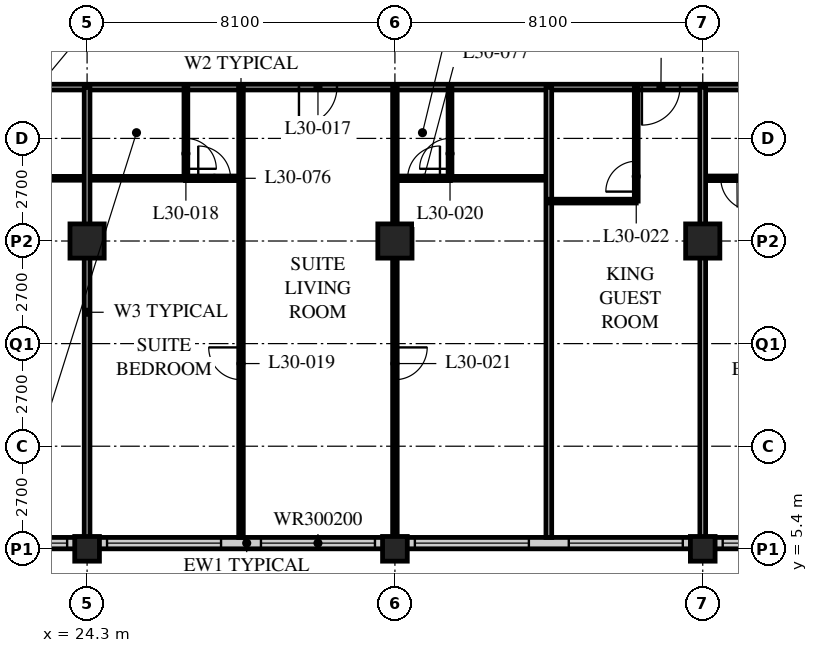
"""IFC4 building model, lengths in metres.
Left out: names, types, materials, properties, quantities, classifications, styles, units other than length and angle.
Written with IfcOpenShell. Run it as: python <this file> out.ifc"""

import sys

from ifc_helpers import new_model, si_unit, direction, frame, frame_2d, origin, origin_2d, place, context, subcontext, project, spatial, rectangle, hollow_rectangle, extrude, element, fill, save


model = new_model("IFC4")
c1 = context("Model", 3, precision=1e-05, world=origin(), true_north=direction((0.0, 1.0)))
c2 = subcontext(c1, "Body", "Model", "MODEL_VIEW")
j1 = project(units=[si_unit("LENGTHUNIT", "METRE"), si_unit("PLANEANGLEUNIT", "RADIAN")], contexts=[c1])
p1 = place(None, origin())
s1 = spatial("IfcSite", under=j1, at=p1, CompositionType="ELEMENT")
p2 = place(p1, origin())
s2 = spatial("IfcBuilding", under=s1, at=p2, CompositionType="ELEMENT")
p3 = place(p2, frame((0.0, 0.0, 120.4)))
s3 = spatial("IfcBuildingStorey", under=s2, at=p3, CompositionType="ELEMENT", Elevation=120.4)
p4 = place(p3, frame((24.3, 5.4, 0.0), z_axis=(0.0, 0.0, 1.0), x_axis=(1.0, 0.0, 0.0)))
e1 = element("IfcColumn", 1, at=p4, inside=s3, PredefinedType="COLUMN", context=c2, shape_type="SweptSolid", body=[
    extrude(hollow_rectangle(XDim=0.65, YDim=0.65, WallThickness=0.055, at=origin_2d()), origin(), (0.0, 0.0, 1.0), 3.4),
])
p5 = place(p3, frame((24.3, 13.5, 0.0), z_axis=(0.0, 0.0, 1.0), x_axis=(1.0, 0.0, 0.0)))
e2 = element("IfcColumn", 2, at=p5, inside=s3, PredefinedType="COLUMN", context=c2, shape_type="SweptSolid", body=[
    extrude(hollow_rectangle(XDim=0.9, YDim=0.9, WallThickness=0.09, at=origin_2d()), origin(), (0.0, 0.0, 1.0), 3.4),
])
p6 = place(p3, frame((32.4, 5.4, 0.0), z_axis=(0.0, 0.0, 1.0), x_axis=(1.0, 0.0, 0.0)))
e3 = element("IfcColumn", 3, at=p6, inside=s3, PredefinedType="COLUMN", context=c2, shape_type="SweptSolid", body=[
    extrude(hollow_rectangle(XDim=0.65, YDim=0.65, WallThickness=0.055, at=origin_2d()), origin(), (0.0, 0.0, 1.0), 3.4),
])
p7 = place(p3, frame((32.4, 13.5, 0.0), z_axis=(0.0, 0.0, 1.0), x_axis=(1.0, 0.0, 0.0)))
e4 = element("IfcColumn", 4, at=p7, inside=s3, PredefinedType="COLUMN", context=c2, shape_type="SweptSolid", body=[
    extrude(hollow_rectangle(XDim=0.9, YDim=0.9, WallThickness=0.09, at=origin_2d()), origin(), (0.0, 0.0, 1.0), 3.4),
])
p8 = place(p3, frame((40.5, 5.4, 0.0), z_axis=(0.0, 0.0, 1.0), x_axis=(1.0, 0.0, 0.0)))
e5 = element("IfcColumn", 5, at=p8, inside=s3, PredefinedType="COLUMN", context=c2, shape_type="SweptSolid", body=[
    extrude(hollow_rectangle(XDim=0.65, YDim=0.65, WallThickness=0.055, at=origin_2d()), origin(), (0.0, 0.0, 1.0), 3.4),
])
p9 = place(p3, frame((40.5, 13.5, 0.0), z_axis=(0.0, 0.0, 1.0), x_axis=(1.0, 0.0, 0.0)))
e6 = element("IfcColumn", 6, at=p9, inside=s3, PredefinedType="COLUMN", context=c2, shape_type="SweptSolid", body=[
    extrude(hollow_rectangle(XDim=0.9, YDim=0.9, WallThickness=0.09, at=origin_2d()), origin(), (0.0, 0.0, 1.0), 3.4),
])
p10 = place(p3, frame((8.4, 5.55, 0.0), z_axis=(0.0, 0.0, 1.0), x_axis=(1.0, 0.0, 0.0)))
e7 = element("IfcWall", 7, at=p10, inside=s3, PredefinedType="SOLIDWALL", context=c2, shape_type="SweptSolid", body=[
    extrude(rectangle(XDim=40.2, YDim=0.3, at=frame_2d((20.1, 0.0))), origin(), (0.0, 0.0, 1.0), 3.19),
])
p11 = place(p10, frame((0.225, 0.0, 0.9)))
e8 = element("IfcOpeningElement", 8, at=p11, cuts=e7, PredefinedType="OPENING", context=c2, shape_type="SweptSolid", body=[
    extrude(rectangle(XDim=3.0, YDim=2.0, at=frame_2d((1.5, 1.0))), frame((0.0, 0.16, 0.0), z_axis=(0.0, -1.0, 0.0), x_axis=(1.0, 0.0, 0.0)), (0.0, 0.0, 1.0), 0.32),
])
p12 = place(p10, frame((4.275, 0.0, 0.9)))
e9 = element("IfcOpeningElement", 9, at=p12, cuts=e7, PredefinedType="OPENING", context=c2, shape_type="SweptSolid", body=[
    extrude(rectangle(XDim=3.0, YDim=2.0, at=frame_2d((1.5, 1.0))), frame((0.0, 0.16, 0.0), z_axis=(0.0, -1.0, 0.0), x_axis=(1.0, 0.0, 0.0)), (0.0, 0.0, 1.0), 0.32),
])
p13 = place(p10, frame((8.325, 0.0, 0.9)))
e10 = element("IfcOpeningElement", 10, at=p13, cuts=e7, PredefinedType="OPENING", context=c2, shape_type="SweptSolid", body=[
    extrude(rectangle(XDim=3.0, YDim=2.0, at=frame_2d((1.5, 1.0))), frame((0.0, 0.16, 0.0), z_axis=(0.0, -1.0, 0.0), x_axis=(1.0, 0.0, 0.0)), (0.0, 0.0, 1.0), 0.32),
])
p14 = place(p10, frame((12.375, 0.0, 0.9)))
e11 = element("IfcOpeningElement", 11, at=p14, cuts=e7, PredefinedType="OPENING", context=c2, shape_type="SweptSolid", body=[
    extrude(rectangle(XDim=3.0, YDim=2.0, at=frame_2d((1.5, 1.0))), frame((0.0, 0.16, 0.0), z_axis=(0.0, -1.0, 0.0), x_axis=(1.0, 0.0, 0.0)), (0.0, 0.0, 1.0), 0.32),
])
p15 = place(p10, frame((16.425, 0.0, 0.9)))
e12 = element("IfcOpeningElement", 12, at=p15, cuts=e7, PredefinedType="OPENING", context=c2, shape_type="SweptSolid", body=[
    extrude(rectangle(XDim=3.0, YDim=2.0, at=frame_2d((1.5, 1.0))), frame((0.0, 0.16, 0.0), z_axis=(0.0, -1.0, 0.0), x_axis=(1.0, 0.0, 0.0)), (0.0, 0.0, 1.0), 0.32),
])
p16 = place(p10, frame((20.475, 0.0, 0.9)))
e13 = element("IfcOpeningElement", 13, at=p16, cuts=e7, PredefinedType="OPENING", context=c2, shape_type="SweptSolid", body=[
    extrude(rectangle(XDim=3.0, YDim=2.0, at=frame_2d((1.5, 1.0))), frame((0.0, 0.16, 0.0), z_axis=(0.0, -1.0, 0.0), x_axis=(1.0, 0.0, 0.0)), (0.0, 0.0, 1.0), 0.32),
])
p17 = place(p10, frame((24.525, 0.0, 0.9)))
e14 = element("IfcOpeningElement", 14, at=p17, cuts=e7, PredefinedType="OPENING", context=c2, shape_type="SweptSolid", body=[
    extrude(rectangle(XDim=3.0, YDim=2.0, at=frame_2d((1.5, 1.0))), frame((0.0, 0.16, 0.0), z_axis=(0.0, -1.0, 0.0), x_axis=(1.0, 0.0, 0.0)), (0.0, 0.0, 1.0), 0.32),
])
p18 = place(p10, frame((28.575, 0.0, 0.9)))
e15 = element("IfcOpeningElement", 15, at=p18, cuts=e7, PredefinedType="OPENING", context=c2, shape_type="SweptSolid", body=[
    extrude(rectangle(XDim=3.0, YDim=2.0, at=frame_2d((1.5, 1.0))), frame((0.0, 0.16, 0.0), z_axis=(0.0, -1.0, 0.0), x_axis=(1.0, 0.0, 0.0)), (0.0, 0.0, 1.0), 0.32),
])
p19 = place(p10, frame((32.625, 0.0, 0.9)))
e16 = element("IfcOpeningElement", 16, at=p19, cuts=e7, PredefinedType="OPENING", context=c2, shape_type="SweptSolid", body=[
    extrude(rectangle(XDim=3.0, YDim=2.0, at=frame_2d((1.5, 1.0))), frame((0.0, 0.16, 0.0), z_axis=(0.0, -1.0, 0.0), x_axis=(1.0, 0.0, 0.0)), (0.0, 0.0, 1.0), 0.32),
])
p20 = place(p10, frame((36.675, 0.0, 0.9)))
e17 = element("IfcOpeningElement", 17, at=p20, cuts=e7, PredefinedType="OPENING", context=c2, shape_type="SweptSolid", body=[
    extrude(rectangle(XDim=3.0, YDim=2.0, at=frame_2d((1.5, 1.0))), frame((0.0, 0.16, 0.0), z_axis=(0.0, -1.0, 0.0), x_axis=(1.0, 0.0, 0.0)), (0.0, 0.0, 1.0), 0.32),
])
p21 = place(p3, frame((12.15, 17.55, 0.0), z_axis=(0.0, 0.0, 1.0), x_axis=(1.0, 0.0, 0.0)))
e18 = element("IfcWall", 18, at=p21, inside=s3, PredefinedType="PARTITIONING", context=c2, shape_type="SweptSolid", body=[
    extrude(rectangle(XDim=32.4, YDim=0.15, at=frame_2d((16.2, 0.0))), origin(), (0.0, 0.0, 1.0), 3.19),
])
p22 = place(p21, frame((5.95, 0.0, 0.0)))
e19 = element("IfcOpeningElement", 19, at=p22, cuts=e18, PredefinedType="OPENING", context=c2, shape_type="SweptSolid", body=[
    extrude(rectangle(XDim=1.0, YDim=2.1, at=frame_2d((0.5, 1.05))), frame((0.0, 0.085, 0.0), z_axis=(0.0, -1.0, 0.0), x_axis=(1.0, 0.0, 0.0)), (0.0, 0.0, 1.0), 0.17),
])
p23 = place(p21, frame((17.725, 0.0, 0.0)))
e20 = element("IfcOpeningElement", 20, at=p23, cuts=e18, PredefinedType="OPENING", context=c2, shape_type="SweptSolid", body=[
    extrude(rectangle(XDim=1.0, YDim=2.1, at=frame_2d((0.5, 1.05))), frame((0.0, 0.085, 0.0), z_axis=(0.0, -1.0, 0.0), x_axis=(1.0, 0.0, 0.0)), (0.0, 0.0, 1.0), 0.17),
])
p24 = place(p21, frame((26.75, 0.0, 0.0)))
e21 = element("IfcOpeningElement", 21, at=p24, cuts=e18, PredefinedType="OPENING", context=c2, shape_type="SweptSolid", body=[
    extrude(rectangle(XDim=1.0, YDim=2.1, at=frame_2d((0.5, 1.05))), frame((0.0, 0.085, 0.0), z_axis=(0.0, -1.0, 0.0), x_axis=(1.0, 0.0, 0.0)), (0.0, 0.0, 1.0), 0.17),
])
p25 = place(p21, frame((1.525, 0.0, 0.0)))
e22 = element("IfcOpeningElement", 22, at=p25, cuts=e18, PredefinedType="OPENING", context=c2, shape_type="SweptSolid", body=[
    extrude(rectangle(XDim=1.0, YDim=2.1, at=frame_2d((0.5, 1.05))), frame((0.0, 0.085, 0.0), z_axis=(0.0, -1.0, 0.0), x_axis=(1.0, 0.0, 0.0)), (0.0, 0.0, 1.0), 0.17),
])
p26 = place(p21, frame((29.875, 0.0, 0.0)))
e23 = element("IfcOpeningElement", 23, at=p26, cuts=e18, PredefinedType="OPENING", context=c2, shape_type="SweptSolid", body=[
    extrude(rectangle(XDim=1.0, YDim=2.1, at=frame_2d((0.5, 1.05))), frame((0.0, 0.085, 0.0), z_axis=(0.0, -1.0, 0.0), x_axis=(1.0, 0.0, 0.0)), (0.0, 0.0, 1.0), 0.17),
])
p27 = place(p3, frame((21.7, 15.15, 0.0), z_axis=(0.0, 0.0, 1.0), x_axis=(1.0, 0.0, 0.0)))
e24 = element("IfcWall", 24, at=p27, inside=s3, PredefinedType="PARTITIONING", context=c2, shape_type="SweptSolid", body=[
    extrude(rectangle(XDim=5.2, YDim=0.1, at=frame_2d((2.6, 0.0))), origin(), (0.0, 0.0, 1.0), 3.19),
])
p28 = place(p3, frame((24.3, 17.55, 0.0), z_axis=(0.0, 0.0, 1.0), x_axis=(0.0, -1.0, 0.0)))
e25 = element("IfcWall", 25, at=p28, inside=s3, PredefinedType="PARTITIONING", context=c2, shape_type="SweptSolid", body=[
    extrude(rectangle(XDim=11.85, YDim=0.15, at=frame_2d((5.925, 0.0))), origin(), (0.0, 0.0, 1.0), 2.578),
])
p29 = place(p3, frame((26.9, 17.55, 0.0), z_axis=(0.0, 0.0, 1.0), x_axis=(0.0, -1.0, 0.0)))
e26 = element("IfcWall", 26, at=p29, inside=s3, PredefinedType="PARTITIONING", context=c2, shape_type="SweptSolid", body=[
    extrude(rectangle(XDim=2.4, YDim=0.1, at=frame_2d((1.2, 0.0))), origin(), (0.0, 0.0, 1.0), 3.19),
])
p30 = place(p29, frame((1.35, 0.0, 0.0)))
e27 = element("IfcOpeningElement", 27, at=p30, cuts=e26, PredefinedType="OPENING", context=c2, shape_type="SweptSolid", body=[
    extrude(rectangle(XDim=0.8, YDim=2.1, at=frame_2d((0.4, 1.05))), frame((0.0, 0.06, 0.0), z_axis=(0.0, -1.0, 0.0), x_axis=(1.0, 0.0, 0.0)), (0.0, 0.0, 1.0), 0.12),
])
p31 = place(p3, frame((28.35, 17.55, 0.0), z_axis=(0.0, 0.0, 1.0), x_axis=(0.0, -1.0, 0.0)))
e28 = element("IfcWall", 28, at=p31, inside=s3, PredefinedType="PARTITIONING", context=c2, shape_type="SweptSolid", body=[
    extrude(rectangle(XDim=11.85, YDim=0.12, at=frame_2d((5.925, 0.0))), origin(), (0.0, 0.0, 1.0), 3.19),
])
p32 = place(p31, frame((6.85, 0.0, 0.0)))
e29 = element("IfcOpeningElement", 29, at=p32, cuts=e28, PredefinedType="OPENING", context=c2, shape_type="SweptSolid", body=[
    extrude(rectangle(XDim=0.85, YDim=2.1, at=frame_2d((0.425, 1.05))), frame((0.0, 0.07, 0.0), z_axis=(0.0, -1.0, 0.0), x_axis=(1.0, 0.0, 0.0)), (0.0, 0.0, 1.0), 0.14),
])
p33 = place(p3, frame((33.85, 15.15, 0.0), z_axis=(0.0, 0.0, 1.0), x_axis=(1.0, 0.0, 0.0)))
e30 = element("IfcWall", 30, at=p33, inside=s3, PredefinedType="PARTITIONING", context=c2, shape_type="SweptSolid", body=[
    extrude(rectangle(XDim=2.6, YDim=0.1, at=frame_2d((1.3, 0.0))), origin(), (0.0, 0.0, 1.0), 3.19),
])
p34 = place(p3, frame((33.85, 17.55, 0.0), z_axis=(0.0, 0.0, 1.0), x_axis=(0.0, -1.0, 0.0)))
e31 = element("IfcWall", 31, at=p34, inside=s3, PredefinedType="PARTITIONING", context=c2, shape_type="SweptSolid", body=[
    extrude(rectangle(XDim=2.4, YDim=0.1, at=frame_2d((1.2, 0.0))), origin(), (0.0, 0.0, 1.0), 3.19),
])
p35 = place(p34, frame((1.35, 0.0, 0.0)))
e32 = element("IfcOpeningElement", 32, at=p35, cuts=e31, PredefinedType="OPENING", context=c2, shape_type="SweptSolid", body=[
    extrude(rectangle(XDim=0.8, YDim=2.1, at=frame_2d((0.4, 1.05))), frame((0.0, 0.06, 0.0), z_axis=(0.0, -1.0, 0.0), x_axis=(1.0, 0.0, 0.0)), (0.0, 0.0, 1.0), 0.12),
])
p36 = place(p3, frame((32.4, 17.55, 0.0), z_axis=(0.0, 0.0, 1.0), x_axis=(0.0, -1.0, 0.0)))
e33 = element("IfcWall", 33, at=p36, inside=s3, PredefinedType="PARTITIONING", context=c2, shape_type="SweptSolid", body=[
    extrude(rectangle(XDim=11.85, YDim=0.12, at=frame_2d((5.925, 0.0))), origin(), (0.0, 0.0, 1.0), 2.578),
])
p37 = place(p36, frame((6.85, 0.0, 0.0)))
e34 = element("IfcOpeningElement", 34, at=p37, cuts=e33, PredefinedType="OPENING", context=c2, shape_type="SweptSolid", body=[
    extrude(rectangle(XDim=0.85, YDim=2.1, at=frame_2d((0.425, 1.05))), frame((0.0, 0.07, 0.0), z_axis=(0.0, -1.0, 0.0), x_axis=(1.0, 0.0, 0.0)), (0.0, 0.0, 1.0), 0.14),
])
p38 = place(p3, frame((36.45, 17.55, 0.0), z_axis=(0.0, 0.0, 1.0), x_axis=(0.0, -1.0, 0.0)))
e35 = element("IfcWall", 35, at=p38, inside=s3, PredefinedType="PARTITIONING", context=c2, shape_type="SweptSolid", body=[
    extrude(rectangle(XDim=11.85, YDim=0.15, at=frame_2d((5.925, 0.0))), origin(), (0.0, 0.0, 1.0), 3.19),
])
p39 = place(p3, frame((36.45, 14.55, 0.0), z_axis=(0.0, 0.0, 1.0), x_axis=(1.0, 0.0, 0.0)))
e36 = element("IfcWall", 36, at=p39, inside=s3, PredefinedType="PARTITIONING", context=c2, shape_type="SweptSolid", body=[
    extrude(rectangle(XDim=2.3, YDim=0.1, at=frame_2d((1.15, 0.0))), origin(), (0.0, 0.0, 1.0), 3.19),
])
p40 = place(p3, frame((38.75, 17.55, 0.0), z_axis=(0.0, 0.0, 1.0), x_axis=(0.0, -1.0, 0.0)))
e37 = element("IfcWall", 37, at=p40, inside=s3, PredefinedType="PARTITIONING", context=c2, shape_type="SweptSolid", body=[
    extrude(rectangle(XDim=3.0, YDim=0.1, at=frame_2d((1.5, 0.0))), origin(), (0.0, 0.0, 1.0), 3.19),
])
p41 = place(p40, frame((1.95, 0.0, 0.0)))
e38 = element("IfcOpeningElement", 38, at=p41, cuts=e37, PredefinedType="OPENING", context=c2, shape_type="SweptSolid", body=[
    extrude(rectangle(XDim=0.8, YDim=2.1, at=frame_2d((0.4, 1.05))), frame((0.0, 0.06, 0.0), z_axis=(0.0, -1.0, 0.0), x_axis=(1.0, 0.0, 0.0)), (0.0, 0.0, 1.0), 0.12),
])
p42 = place(p3, frame((40.5, 15.15, 0.0), z_axis=(0.0, 0.0, 1.0), x_axis=(1.0, 0.0, 0.0)))
e39 = element("IfcWall", 39, at=p42, inside=s3, PredefinedType="PARTITIONING", context=c2, shape_type="SweptSolid", body=[
    extrude(rectangle(XDim=8.05, YDim=0.12, at=frame_2d((4.025, 0.0))), origin(), (0.0, 0.0, 1.0), 3.19),
])
p43 = place(p42, frame((0.475, 0.0, 0.0)))
e40 = element("IfcOpeningElement", 40, at=p43, cuts=e39, PredefinedType="OPENING", context=c2, shape_type="SweptSolid", body=[
    extrude(rectangle(XDim=0.85, YDim=2.1, at=frame_2d((0.425, 1.05))), frame((0.0, 0.07, 0.0), z_axis=(0.0, -1.0, 0.0), x_axis=(1.0, 0.0, 0.0)), (0.0, 0.0, 1.0), 0.14),
])
p44 = place(p42, frame((4.325, 0.0, 0.0)))
e41 = element("IfcOpeningElement", 41, at=p44, cuts=e39, PredefinedType="OPENING", context=c2, shape_type="SweptSolid", body=[
    extrude(rectangle(XDim=0.85, YDim=2.1, at=frame_2d((0.425, 1.05))), frame((0.0, 0.07, 0.0), z_axis=(0.0, -1.0, 0.0), x_axis=(1.0, 0.0, 0.0)), (0.0, 0.0, 1.0), 0.14),
])
p45 = place(p3, frame((40.5, 17.55, 0.0), z_axis=(0.0, 0.0, 1.0), x_axis=(0.0, -1.0, 0.0)))
e42 = element("IfcWall", 42, at=p45, inside=s3, PredefinedType="PARTITIONING", context=c2, shape_type="SweptSolid", body=[
    extrude(rectangle(XDim=11.85, YDim=0.15, at=frame_2d((5.925, 0.0))), origin(), (0.0, 0.0, 1.0), 2.578),
])
p46 = place(p3, frame((28.35, 15.15, 0.0), z_axis=(0.0, 0.0, 1.0), x_axis=(-1.0, 0.0, 0.0)))
e43 = element("IfcWall", 43, at=p46, inside=s3, PredefinedType="PARTITIONING", context=c2, shape_type="SweptSolid", body=[
    extrude(rectangle(XDim=1.46, YDim=0.12, at=frame_2d((0.73, 0.0))), origin(), (0.0, 0.0, 1.0), 3.19),
])
p47 = place(p46, frame((0.275, 0.0, 0.0)))
e44 = element("IfcOpeningElement", 44, at=p47, cuts=e43, PredefinedType="OPENING", context=c2, shape_type="SweptSolid", body=[
    extrude(rectangle(XDim=0.85, YDim=2.1, at=frame_2d((0.425, 1.05))), frame((0.0, 0.07, 0.0), z_axis=(0.0, -1.0, 0.0), x_axis=(1.0, 0.0, 0.0)), (0.0, 0.0, 1.0), 0.14),
])
p48 = place(p3, frame((33.86, 15.15, 0.0), z_axis=(0.0, 0.0, 1.0), x_axis=(-1.0, 0.0, 0.0)))
e45 = element("IfcWall", 45, at=p48, inside=s3, PredefinedType="PARTITIONING", context=c2, shape_type="SweptSolid", body=[
    extrude(rectangle(XDim=1.46, YDim=0.12, at=frame_2d((0.73, 0.0))), origin(), (0.0, 0.0, 1.0), 3.19),
])
p49 = place(p48, frame((0.275, 0.0, 0.0)))
e46 = element("IfcOpeningElement", 46, at=p49, cuts=e45, PredefinedType="OPENING", context=c2, shape_type="SweptSolid", body=[
    extrude(rectangle(XDim=0.85, YDim=2.1, at=frame_2d((0.425, 1.05))), frame((0.0, 0.07, 0.0), z_axis=(0.0, -1.0, 0.0), x_axis=(1.0, 0.0, 0.0)), (0.0, 0.0, 1.0), 0.14),
])
p50 = place(p14, origin())
e47 = element("IfcWindow", 47, at=p50, inside=s3, PartitioningType="SINGLE_PANEL", PredefinedType="WINDOW", context=c2, shape_type="SweptSolid", body=[
    extrude(rectangle(XDim=3.0, YDim=2.0, at=frame_2d((1.5, 1.0))), frame((0.0, 0.03, 0.0), z_axis=(0.0, -1.0, 0.0), x_axis=(1.0, 0.0, 0.0)), (0.0, 0.0, 1.0), 0.06),
])
fill(e11, e47)
p51 = place(p15, origin())
e48 = element("IfcWindow", 48, at=p51, inside=s3, PartitioningType="SINGLE_PANEL", PredefinedType="WINDOW", context=c2, shape_type="SweptSolid", body=[
    extrude(rectangle(XDim=3.0, YDim=2.0, at=frame_2d((1.5, 1.0))), frame((0.0, 0.03, 0.0), z_axis=(0.0, -1.0, 0.0), x_axis=(1.0, 0.0, 0.0)), (0.0, 0.0, 1.0), 0.06),
])
fill(e12, e48)
p52 = place(p16, origin())
e49 = element("IfcWindow", 49, at=p52, inside=s3, PartitioningType="SINGLE_PANEL", PredefinedType="WINDOW", context=c2, shape_type="SweptSolid", body=[
    extrude(rectangle(XDim=3.0, YDim=2.0, at=frame_2d((1.5, 1.0))), frame((0.0, 0.03, 0.0), z_axis=(0.0, -1.0, 0.0), x_axis=(1.0, 0.0, 0.0)), (0.0, 0.0, 1.0), 0.06),
])
fill(e13, e49)
p53 = place(p17, origin())
e50 = element("IfcWindow", 50, at=p53, inside=s3, PartitioningType="SINGLE_PANEL", PredefinedType="WINDOW", context=c2, shape_type="SweptSolid", body=[
    extrude(rectangle(XDim=3.0, YDim=2.0, at=frame_2d((1.5, 1.0))), frame((0.0, 0.03, 0.0), z_axis=(0.0, -1.0, 0.0), x_axis=(1.0, 0.0, 0.0)), (0.0, 0.0, 1.0), 0.06),
])
fill(e14, e50)
p54 = place(p18, origin())
e51 = element("IfcWindow", 51, at=p54, inside=s3, PartitioningType="SINGLE_PANEL", PredefinedType="WINDOW", context=c2, shape_type="SweptSolid", body=[
    extrude(rectangle(XDim=3.0, YDim=2.0, at=frame_2d((1.5, 1.0))), frame((0.0, 0.03, 0.0), z_axis=(0.0, -1.0, 0.0), x_axis=(1.0, 0.0, 0.0)), (0.0, 0.0, 1.0), 0.06),
])
fill(e15, e51)
p55 = place(p19, origin())
e52 = element("IfcWindow", 52, at=p55, inside=s3, PartitioningType="SINGLE_PANEL", PredefinedType="WINDOW", context=c2, shape_type="SweptSolid", body=[
    extrude(rectangle(XDim=3.0, YDim=2.0, at=frame_2d((1.5, 1.0))), frame((0.0, 0.03, 0.0), z_axis=(0.0, -1.0, 0.0), x_axis=(1.0, 0.0, 0.0)), (0.0, 0.0, 1.0), 0.06),
])
fill(e16, e52)
p56 = place(p23, origin())
e53 = element("IfcDoor", 53, at=p56, inside=s3, OperationType="SINGLE_SWING_RIGHT", PredefinedType="DOOR", context=c2, shape_type="SweptSolid", body=[
    extrude(rectangle(XDim=1.0, YDim=2.1, at=frame_2d((0.5, 1.05))), frame((0.0, 0.025, 0.0), z_axis=(0.0, -1.0, 0.0), x_axis=(1.0, 0.0, 0.0)), (0.0, 0.0, 1.0), 0.05),
])
fill(e20, e53)
p57 = place(p30, origin())
e54 = element("IfcDoor", 54, at=p57, inside=s3, OperationType="SINGLE_SWING_RIGHT", PredefinedType="DOOR", context=c2, shape_type="SweptSolid", body=[
    extrude(rectangle(XDim=0.8, YDim=2.1, at=frame_2d((0.4, 1.05))), frame((0.0, 0.025, 0.0), z_axis=(0.0, -1.0, 0.0), x_axis=(1.0, 0.0, 0.0)), (0.0, 0.0, 1.0), 0.05),
])
fill(e27, e54)
p58 = place(p32, origin())
e55 = element("IfcDoor", 55, at=p58, inside=s3, OperationType="SINGLE_SWING_RIGHT", PredefinedType="DOOR", context=c2, shape_type="SweptSolid", body=[
    extrude(rectangle(XDim=0.85, YDim=2.1, at=frame_2d((0.425, 1.05))), frame((0.0, 0.025, 0.0), z_axis=(0.0, -1.0, 0.0), x_axis=(1.0, 0.0, 0.0)), (0.0, 0.0, 1.0), 0.05),
])
fill(e29, e55)
p59 = place(p35, origin())
e56 = element("IfcDoor", 56, at=p59, inside=s3, OperationType="SINGLE_SWING_LEFT", PredefinedType="DOOR", context=c2, shape_type="SweptSolid", body=[
    extrude(rectangle(XDim=0.8, YDim=2.1, at=frame_2d((0.4, 1.05))), frame((0.0, 0.025, 0.0), z_axis=(0.0, -1.0, 0.0), x_axis=(1.0, 0.0, 0.0)), (0.0, 0.0, 1.0), 0.05),
])
fill(e32, e56)
p60 = place(p37, origin())
e57 = element("IfcDoor", 57, at=p60, inside=s3, OperationType="SINGLE_SWING_LEFT", PredefinedType="DOOR", context=c2, shape_type="SweptSolid", body=[
    extrude(rectangle(XDim=0.85, YDim=2.1, at=frame_2d((0.425, 1.05))), frame((0.0, 0.025, 0.0), z_axis=(0.0, -1.0, 0.0), x_axis=(1.0, 0.0, 0.0)), (0.0, 0.0, 1.0), 0.05),
])
fill(e34, e57)
p61 = place(p41, origin())
e58 = element("IfcDoor", 58, at=p61, inside=s3, OperationType="SINGLE_SWING_LEFT", PredefinedType="DOOR", context=c2, shape_type="SweptSolid", body=[
    extrude(rectangle(XDim=0.8, YDim=2.1, at=frame_2d((0.4, 1.05))), frame((0.0, 0.025, 0.0), z_axis=(0.0, -1.0, 0.0), x_axis=(1.0, 0.0, 0.0)), (0.0, 0.0, 1.0), 0.05),
])
fill(e38, e58)
p62 = place(p24, origin())
e59 = element("IfcDoor", 59, at=p62, inside=s3, OperationType="SINGLE_SWING_RIGHT", PredefinedType="DOOR", context=c2, shape_type="SweptSolid", body=[
    extrude(rectangle(XDim=1.0, YDim=2.1, at=frame_2d((0.5, 1.05))), frame((0.0, 0.025, 0.0), z_axis=(0.0, -1.0, 0.0), x_axis=(1.0, 0.0, 0.0)), (0.0, 0.0, 1.0), 0.05),
])
fill(e21, e59)
p63 = place(p43, origin())
e60 = element("IfcDoor", 60, at=p63, inside=s3, OperationType="SINGLE_SWING_LEFT", PredefinedType="DOOR", context=c2, shape_type="SweptSolid", body=[
    extrude(rectangle(XDim=0.85, YDim=2.1, at=frame_2d((0.425, 1.05))), frame((0.0, 0.025, 0.0), z_axis=(0.0, -1.0, 0.0), x_axis=(1.0, 0.0, 0.0)), (0.0, 0.0, 1.0), 0.05),
])
fill(e40, e60)
p64 = place(p47, origin())
e61 = element("IfcDoor", 61, at=p64, inside=s3, OperationType="SINGLE_SWING_LEFT", PredefinedType="DOOR", context=c2, shape_type="SweptSolid", body=[
    extrude(rectangle(XDim=0.85, YDim=2.1, at=frame_2d((0.425, 1.05))), frame((0.0, 0.025, 0.0), z_axis=(0.0, -1.0, 0.0), x_axis=(1.0, 0.0, 0.0)), (0.0, 0.0, 1.0), 0.05),
])
fill(e44, e61)
p65 = place(p49, origin())
e62 = element("IfcDoor", 62, at=p65, inside=s3, OperationType="SINGLE_SWING_RIGHT", PredefinedType="DOOR", context=c2, shape_type="SweptSolid", body=[
    extrude(rectangle(XDim=0.85, YDim=2.1, at=frame_2d((0.425, 1.05))), frame((0.0, 0.025, 0.0), z_axis=(0.0, -1.0, 0.0), x_axis=(1.0, 0.0, 0.0)), (0.0, 0.0, 1.0), 0.05),
])
fill(e46, e62)
save(model, sys.argv[1])
